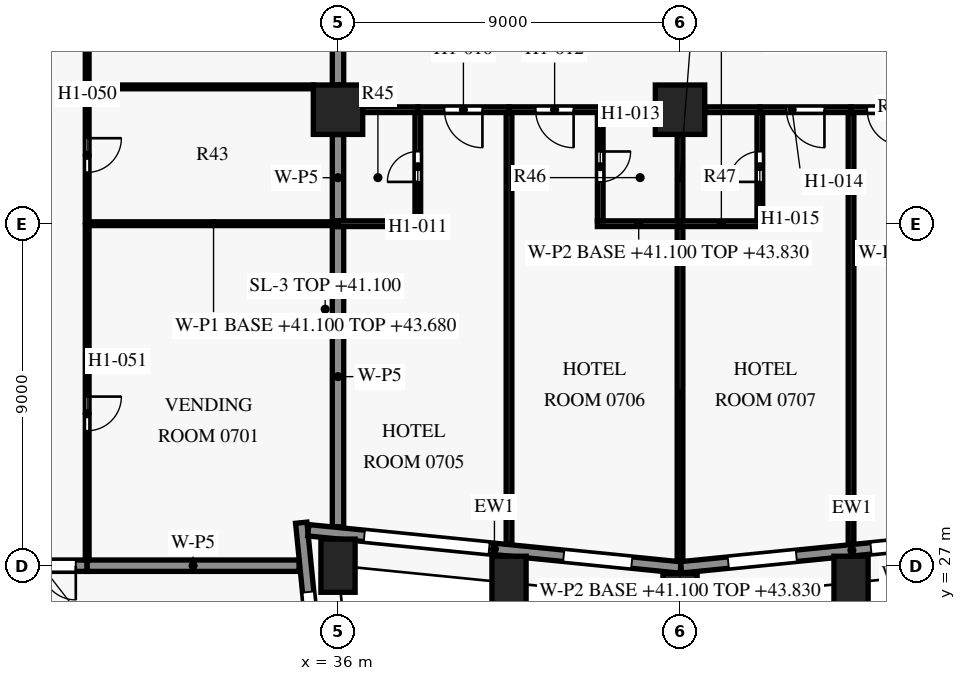
"""IFC4 building model, lengths in metres.
Left out: names, types, materials, properties, quantities, classifications, styles, units other than length and angle.
Written with IfcOpenShell. Run it as: python <this file> out.ifc"""

import sys

from ifc_helpers import new_model, si_unit, direction, frame, frame_2d, origin, origin_2d, place, context, subcontext, project, spatial, rectangle, extrude, element, fill, save


model = new_model("IFC4")
c1 = context("Model", 3, precision=1e-05, world=origin(), true_north=direction((0.0, 1.0)))
c2 = subcontext(c1, "Body", "Model", "MODEL_VIEW")
j1 = project(units=[si_unit("LENGTHUNIT", "METRE"), si_unit("PLANEANGLEUNIT", "RADIAN")], contexts=[c1])
p1 = place(None, origin())
s1 = spatial("IfcSite", under=j1, at=p1, CompositionType="ELEMENT")
p2 = place(p1, origin())
s2 = spatial("IfcBuilding", under=s1, at=p2, CompositionType="ELEMENT")
p3 = place(p2, frame((0.0, 0.0, 41.1)))
s3 = spatial("IfcBuildingStorey", under=s2, at=p3, CompositionType="ELEMENT", Elevation=41.1)
for number, where, z_axis, x_axis in (
    (1, (36.0, 27.0, 0.0), (0.0, 0.0, 1.0), (-0.1, 0.995, 0.0)),
    (2, (40.5, 26.55, 0.0), (0.0, 0.0, 1.0), (0.995, -0.1, 0.0)),
    (3, (45.0, 26.1, 0.0), (0.0, 0.0, 1.0), (1.0, 0.0, 0.0)),
    (4, (49.5, 26.55, 0.0), (0.0, 0.0, 1.0), (0.995, 0.1, 0.0)),
):
    element("IfcColumn", number, at=place(p3, frame(where, z_axis=z_axis, x_axis=x_axis)), inside=s3, PredefinedType="COLUMN", context=c2, shape_type="SweptSolid", body=[
        extrude(rectangle(XDim=0.9, YDim=1.4, at=origin_2d()), origin(), (0.0, 0.0, 1.0), 3.6),
    ])
for number, where, z_axis, x_axis in (
    (5, (36.0, 39.0, 0.0), (0.0, 0.0, 1.0), (1.0, 0.0, 0.0)),
    (6, (45.0, 39.0, 0.0), (0.0, 0.0, 1.0), (1.0, 0.0, 0.0)),
):
    element("IfcColumn", number, at=place(p3, frame(where, z_axis=z_axis, x_axis=x_axis)), inside=s3, PredefinedType="COLUMN", context=c2, shape_type="SweptSolid", body=[
        extrude(rectangle(XDim=1.3, YDim=1.3, at=origin_2d()), origin(), (0.0, 0.0, 1.0), 3.6),
    ])
p4 = place(p3, frame((35.033, 28.132, 0.0), z_axis=(0.0, 0.0, 1.0), x_axis=(0.099487051997, -0.995038856771, 0.0)))
e7 = element("IfcWall", 7, at=p4, inside=s3, PredefinedType="SOLIDWALL", context=c2, shape_type="SweptSolid", body=[
    extrude(rectangle(XDim=10.152, YDim=0.3, at=frame_2d((5.076, 0.0))), origin(), (0.0, 0.0, 1.0), 2.95),
])
p5 = place(p4, frame((1.833, 0.0, 0.15)))
e8 = element("IfcOpeningElement", 8, at=p5, cuts=e7, PredefinedType="OPENING", context=c2, shape_type="SweptSolid", body=[
    extrude(rectangle(XDim=3.3, YDim=2.4, at=frame_2d((1.65, 1.2))), frame((0.0, 0.16, 0.0), z_axis=(0.0, -1.0, 0.0), x_axis=(1.0, 0.0, 0.0)), (0.0, 0.0, 1.0), 0.32),
])
p6 = place(p4, frame((7.106, 0.0, 0.75)))
e9 = element("IfcOpeningElement", 9, at=p6, cuts=e7, PredefinedType="OPENING", context=c2, shape_type="SweptSolid", body=[
    extrude(rectangle(XDim=1.8, YDim=1.8, at=frame_2d((0.9, 0.9))), frame((0.0, 0.16, 0.0), z_axis=(0.0, -1.0, 0.0), x_axis=(1.0, 0.0, 0.0)), (0.0, 0.0, 1.0), 0.32),
])
p7 = place(p3, frame((45.015, 26.953, 0.0), z_axis=(0.0, 0.0, 1.0), x_axis=(-0.995036699177, 0.099508629231, 0.0)))
e10 = element("IfcWall", 10, at=p7, inside=s3, PredefinedType="SOLIDWALL", context=c2, shape_type="SweptSolid", body=[
    extrude(rectangle(XDim=9.846, YDim=0.3, at=frame_2d((4.923, 0.0))), origin(), (0.0, 0.0, 1.0), 2.95),
])
p8 = place(p7, frame((1.291, 0.0, 0.75)))
e11 = element("IfcOpeningElement", 11, at=p8, cuts=e10, PredefinedType="OPENING", context=c2, shape_type="SweptSolid", body=[
    extrude(rectangle(XDim=1.8, YDim=1.8, at=frame_2d((0.9, 0.9))), frame((0.0, 0.16, 0.0), z_axis=(0.0, -1.0, 0.0), x_axis=(1.0, 0.0, 0.0)), (0.0, 0.0, 1.0), 0.32),
])
p9 = place(p7, frame((5.064, 0.0, 0.15)))
e12 = element("IfcOpeningElement", 12, at=p9, cuts=e10, PredefinedType="OPENING", context=c2, shape_type="SweptSolid", body=[
    extrude(rectangle(XDim=3.3, YDim=2.4, at=frame_2d((1.65, 1.2))), frame((0.0, 0.16, 0.0), z_axis=(0.0, -1.0, 0.0), x_axis=(1.0, 0.0, 0.0)), (0.0, 0.0, 1.0), 0.32),
])
p10 = place(p3, frame((54.015, 27.856, 0.0), z_axis=(0.0, 0.0, 1.0), x_axis=(-0.995037993253, -0.099495688264, 0.0)))
e13 = element("IfcWall", 13, at=p10, inside=s3, PredefinedType="SOLIDWALL", context=c2, shape_type="SweptSolid", body=[
    extrude(rectangle(XDim=9.03, YDim=0.3, at=frame_2d((4.515, 0.0))), origin(), (0.0, 0.0, 1.0), 2.95),
])
p11 = place(p10, frame((0.711, 0.0, 0.15)))
e14 = element("IfcOpeningElement", 14, at=p11, cuts=e13, PredefinedType="OPENING", context=c2, shape_type="SweptSolid", body=[
    extrude(rectangle(XDim=3.3, YDim=2.4, at=frame_2d((1.65, 1.2))), frame((0.0, 0.16, 0.0), z_axis=(0.0, -1.0, 0.0), x_axis=(1.0, 0.0, 0.0)), (0.0, 0.0, 1.0), 0.32),
])
p12 = place(p10, frame((5.984, 0.0, 0.75)))
e15 = element("IfcOpeningElement", 15, at=p12, cuts=e13, PredefinedType="OPENING", context=c2, shape_type="SweptSolid", body=[
    extrude(rectangle(XDim=1.8, YDim=1.8, at=frame_2d((0.9, 0.9))), frame((0.0, 0.16, 0.0), z_axis=(0.0, -1.0, 0.0), x_axis=(1.0, 0.0, 0.0)), (0.0, 0.0, 1.0), 0.32),
])
p13 = place(p3, frame((29.4, 27.0, 0.0), z_axis=(0.0, 0.0, 1.0), x_axis=(-1.0, 0.0, 0.0)))
e16 = element("IfcWall", 16, at=p13, inside=s3, PredefinedType="PARTITIONING", context=c2, shape_type="SweptSolid", body=[
    extrude(rectangle(XDim=2.4, YDim=0.3, at=frame_2d((1.2, 0.0))), origin(), (0.0, 0.0, 1.0), 2.58),
])
p14 = place(p13, frame((0.3, 0.0, 0.0)))
e17 = element("IfcOpeningElement", 17, at=p14, cuts=e16, PredefinedType="OPENING", context=c2, shape_type="SweptSolid", body=[
    extrude(rectangle(XDim=1.8, YDim=2.1, at=frame_2d((0.9, 1.05))), frame((0.0, 0.16, 0.0), z_axis=(0.0, -1.0, 0.0), x_axis=(1.0, 0.0, 0.0)), (0.0, 0.0, 1.0), 0.32),
])
p15 = place(p3, frame((34.975, 27.0, 0.0), z_axis=(0.0, 0.0, 1.0), x_axis=(-1.0, 0.0, 0.0)))
e18 = element("IfcWall", 18, at=p15, inside=s3, PredefinedType="PARTITIONING", context=c2, shape_type="SweptSolid", body=[
    extrude(rectangle(XDim=5.575, YDim=0.3, at=frame_2d((2.788, 0.0))), origin(), (0.0, 0.0, 1.0), 2.58),
])
p16 = place(p3, frame((36.0, 35.925, 0.0), z_axis=(0.0, 0.0, 1.0), x_axis=(0.0, -1.0, 0.0)))
e19 = element("IfcWall", 19, at=p16, inside=s3, PredefinedType="PARTITIONING", context=c2, shape_type="SweptSolid", body=[
    extrude(rectangle(XDim=7.9, YDim=0.3, at=frame_2d((3.95, 0.0))), origin(), (0.0, 0.0, 1.0), 2.58),
])
p17 = place(p3, frame((45.0, 35.925, 0.0), z_axis=(0.0, 0.0, 1.0), x_axis=(0.0, -1.0, 0.0)))
e20 = element("IfcWall", 20, at=p17, inside=s3, PredefinedType="PARTITIONING", context=c2, shape_type="SweptSolid", body=[
    extrude(rectangle(XDim=8.8, YDim=0.15, at=frame_2d((4.4, 0.0))), origin(), (0.0, 0.0, 1.0), 2.73),
])
p18 = place(p3, frame((29.4, 35.95, 0.0), z_axis=(0.0, 0.0, 1.0), x_axis=(0.0, -1.0, 0.0)))
e21 = element("IfcWall", 21, at=p18, inside=s3, PredefinedType="PARTITIONING", context=c2, shape_type="SweptSolid", body=[
    extrude(rectangle(XDim=8.8, YDim=0.1, at=frame_2d((4.4, 0.0))), origin(), (0.0, 0.0, 1.0), 3.28),
])
p19 = place(p18, frame((4.5, 0.0, 0.0)))
e22 = element("IfcOpeningElement", 22, at=p19, cuts=e21, PredefinedType="OPENING", context=c2, shape_type="SweptSolid", body=[
    extrude(rectangle(XDim=0.9, YDim=2.1, at=frame_2d((0.45, 1.05))), frame((0.0, 0.06, 0.0), z_axis=(0.0, -1.0, 0.0), x_axis=(1.0, 0.0, 0.0)), (0.0, 0.0, 1.0), 0.12),
])
p20 = place(p3, frame((36.0, 36.0, 0.0), z_axis=(0.0, 0.0, 1.0), x_axis=(-1.0, 0.0, 0.0)))
e23 = element("IfcWall", 23, at=p20, inside=s3, PredefinedType="PARTITIONING", context=c2, shape_type="SweptSolid", body=[
    extrude(rectangle(XDim=6.55, YDim=0.1, at=frame_2d((3.275, 0.0))), origin(), (0.0, 0.0, 1.0), 2.58),
])
p21 = place(p3, frame((36.0, 36.0, 0.0), z_axis=(0.0, 0.0, 1.0), x_axis=(1.0, 0.0, 0.0)))
e24 = element("IfcWall", 24, at=p21, inside=s3, PredefinedType="PARTITIONING", context=c2, shape_type="SweptSolid", body=[
    extrude(rectangle(XDim=2.175, YDim=0.15, at=frame_2d((1.087, 0.0))), origin(), (0.0, 0.0, 1.0), 2.58),
])
for number, where, z_axis, x_axis in (
    (25, (42.825, 36.0, 0.0), (0.0, 0.0, 1.0), (1.0, 0.0, 0.0)),
    (26, (45.0, 36.0, 0.0), (0.0, 0.0, 1.0), (1.0, 0.0, 0.0)),
):
    element("IfcWall", number, at=place(p3, frame(where, z_axis=z_axis, x_axis=x_axis)), inside=s3, PredefinedType="PARTITIONING", context=c2, shape_type="SweptSolid", body=[
        extrude(rectangle(XDim=2.175, YDim=0.15, at=frame_2d((1.087, 0.0))), origin(), (0.0, 0.0, 1.0), 2.73),
    ])
p22 = place(p3, frame((38.1, 36.075, 0.0), z_axis=(0.0, 0.0, 1.0), x_axis=(0.0, 1.0, 0.0)))
e27 = element("IfcWall", 27, at=p22, inside=s3, PredefinedType="PARTITIONING", context=c2, shape_type="SweptSolid", body=[
    extrude(rectangle(XDim=2.85, YDim=0.15, at=frame_2d((1.425, 0.0))), origin(), (0.0, 0.0, 1.0), 2.58),
])
p23 = place(p22, frame((1.025, 0.0, 0.0)))
e28 = element("IfcOpeningElement", 28, at=p23, cuts=e27, PredefinedType="OPENING", context=c2, shape_type="SweptSolid", body=[
    extrude(rectangle(XDim=0.8, YDim=2.1, at=frame_2d((0.4, 1.05))), frame((0.0, 0.085, 0.0), z_axis=(0.0, -1.0, 0.0), x_axis=(1.0, 0.0, 0.0)), (0.0, 0.0, 1.0), 0.17),
])
p24 = place(p3, frame((47.1, 36.075, 0.0), z_axis=(0.0, 0.0, 1.0), x_axis=(0.0, 1.0, 0.0)))
e29 = element("IfcWall", 29, at=p24, inside=s3, PredefinedType="PARTITIONING", context=c2, shape_type="SweptSolid", body=[
    extrude(rectangle(XDim=2.85, YDim=0.15, at=frame_2d((1.425, 0.0))), origin(), (0.0, 0.0, 1.0), 2.58),
])
p25 = place(p24, frame((1.025, 0.0, 0.0)))
e30 = element("IfcOpeningElement", 30, at=p25, cuts=e29, PredefinedType="OPENING", context=c2, shape_type="SweptSolid", body=[
    extrude(rectangle(XDim=0.8, YDim=2.1, at=frame_2d((0.4, 1.05))), frame((0.0, 0.085, 0.0), z_axis=(0.0, -1.0, 0.0), x_axis=(1.0, 0.0, 0.0)), (0.0, 0.0, 1.0), 0.17),
])
p26 = place(p3, frame((36.0, 38.345, 0.0), z_axis=(0.0, 0.0, 1.0), x_axis=(0.0, -1.0, 0.0)))
e31 = element("IfcWall", 31, at=p26, inside=s3, PredefinedType="PARTITIONING", context=c2, shape_type="SweptSolid", body=[
    extrude(rectangle(XDim=2.27, YDim=0.3, at=frame_2d((1.135, 0.0))), origin(), (0.0, 0.0, 1.0), 2.58),
])
p27 = place(p3, frame((45.0, 38.345, 0.0), z_axis=(0.0, 0.0, 1.0), x_axis=(0.0, -1.0, 0.0)))
e32 = element("IfcWall", 32, at=p27, inside=s3, PredefinedType="PARTITIONING", context=c2, shape_type="SweptSolid", body=[
    extrude(rectangle(XDim=2.27, YDim=0.15, at=frame_2d((1.135, 0.0))), origin(), (0.0, 0.0, 1.0), 2.73),
])
p28 = place(p3, frame((40.5, 38.925, 0.0), z_axis=(0.0, 0.0, 1.0), x_axis=(0.0, -1.0, 0.0)))
e33 = element("IfcWall", 33, at=p28, inside=s3, PredefinedType="PARTITIONING", context=c2, shape_type="SweptSolid", body=[
    extrude(rectangle(XDim=11.35, YDim=0.15, at=frame_2d((5.675, 0.0))), origin(), (0.0, 0.0, 1.0), 2.58),
])
p29 = place(p3, frame((42.9, 38.925, 0.0), z_axis=(0.0, 0.0, 1.0), x_axis=(0.0, -1.0, 0.0)))
e34 = element("IfcWall", 34, at=p29, inside=s3, PredefinedType="PARTITIONING", context=c2, shape_type="SweptSolid", body=[
    extrude(rectangle(XDim=2.85, YDim=0.15, at=frame_2d((1.425, 0.0))), origin(), (0.0, 0.0, 1.0), 2.58),
])
p30 = place(p29, frame((1.025, 0.0, 0.0)))
e35 = element("IfcOpeningElement", 35, at=p30, cuts=e34, PredefinedType="OPENING", context=c2, shape_type="SweptSolid", body=[
    extrude(rectangle(XDim=0.8, YDim=2.1, at=frame_2d((0.4, 1.05))), frame((0.0, 0.085, 0.0), z_axis=(0.0, -1.0, 0.0), x_axis=(1.0, 0.0, 0.0)), (0.0, 0.0, 1.0), 0.17),
])
p31 = place(p3, frame((49.5, 38.925, 0.0), z_axis=(0.0, 0.0, 1.0), x_axis=(0.0, -1.0, 0.0)))
e36 = element("IfcWall", 36, at=p31, inside=s3, PredefinedType="PARTITIONING", context=c2, shape_type="SweptSolid", body=[
    extrude(rectangle(XDim=11.35, YDim=0.15, at=frame_2d((5.675, 0.0))), origin(), (0.0, 0.0, 1.0), 2.58),
])
p32 = place(p3, frame((38.1, 39.0, 0.0), z_axis=(0.0, 0.0, 1.0), x_axis=(-1.0, 0.0, 0.0)))
e37 = element("IfcWall", 37, at=p32, inside=s3, PredefinedType="PARTITIONING", context=c2, shape_type="SweptSolid", body=[
    extrude(rectangle(XDim=1.445, YDim=0.15, at=frame_2d((0.723, 0.0))), origin(), (0.0, 0.0, 1.0), 2.58),
])
p33 = place(p3, frame((40.5, 39.0, 0.0), z_axis=(0.0, 0.0, 1.0), x_axis=(-1.0, 0.0, 0.0)))
e38 = element("IfcWall", 38, at=p33, inside=s3, PredefinedType="PARTITIONING", context=c2, shape_type="SweptSolid", body=[
    extrude(rectangle(XDim=2.4, YDim=0.15, at=frame_2d((1.2, 0.0))), origin(), (0.0, 0.0, 1.0), 2.58),
])
p34 = place(p33, frame((0.7, 0.0, 0.0)))
e39 = element("IfcOpeningElement", 39, at=p34, cuts=e38, PredefinedType="OPENING", context=c2, shape_type="SweptSolid", body=[
    extrude(rectangle(XDim=1.0, YDim=2.1, at=frame_2d((0.5, 1.05))), frame((0.0, 0.085, 0.0), z_axis=(0.0, -1.0, 0.0), x_axis=(1.0, 0.0, 0.0)), (0.0, 0.0, 1.0), 0.17),
])
p35 = place(p3, frame((42.9, 39.0, 0.0), z_axis=(0.0, 0.0, 1.0), x_axis=(-1.0, 0.0, 0.0)))
e40 = element("IfcWall", 40, at=p35, inside=s3, PredefinedType="PARTITIONING", context=c2, shape_type="SweptSolid", body=[
    extrude(rectangle(XDim=2.4, YDim=0.15, at=frame_2d((1.2, 0.0))), origin(), (0.0, 0.0, 1.0), 2.58),
])
p36 = place(p35, frame((0.7, 0.0, 0.0)))
e41 = element("IfcOpeningElement", 41, at=p36, cuts=e40, PredefinedType="OPENING", context=c2, shape_type="SweptSolid", body=[
    extrude(rectangle(XDim=1.0, YDim=2.1, at=frame_2d((0.5, 1.05))), frame((0.0, 0.085, 0.0), z_axis=(0.0, -1.0, 0.0), x_axis=(1.0, 0.0, 0.0)), (0.0, 0.0, 1.0), 0.17),
])
for number, where, z_axis, x_axis in (
    (42, (44.345, 39.0, 0.0), (0.0, 0.0, 1.0), (-1.0, 0.0, 0.0)),
    (43, (47.1, 39.0, 0.0), (0.0, 0.0, 1.0), (-1.0, 0.0, 0.0)),
):
    element("IfcWall", number, at=place(p3, frame(where, z_axis=z_axis, x_axis=x_axis)), inside=s3, PredefinedType="PARTITIONING", context=c2, shape_type="SweptSolid", body=[
        extrude(rectangle(XDim=1.445, YDim=0.15, at=frame_2d((0.723, 0.0))), origin(), (0.0, 0.0, 1.0), 2.58),
    ])
p37 = place(p3, frame((49.5, 39.0, 0.0), z_axis=(0.0, 0.0, 1.0), x_axis=(-1.0, 0.0, 0.0)))
e44 = element("IfcWall", 44, at=p37, inside=s3, PredefinedType="PARTITIONING", context=c2, shape_type="SweptSolid", body=[
    extrude(rectangle(XDim=2.4, YDim=0.15, at=frame_2d((1.2, 0.0))), origin(), (0.0, 0.0, 1.0), 2.58),
])
p38 = place(p37, frame((0.7, 0.0, 0.0)))
e45 = element("IfcOpeningElement", 45, at=p38, cuts=e44, PredefinedType="OPENING", context=c2, shape_type="SweptSolid", body=[
    extrude(rectangle(XDim=1.0, YDim=2.1, at=frame_2d((0.5, 1.05))), frame((0.0, 0.085, 0.0), z_axis=(0.0, -1.0, 0.0), x_axis=(1.0, 0.0, 0.0)), (0.0, 0.0, 1.0), 0.17),
])
p39 = place(p3, frame((51.3, 39.0, 0.0), z_axis=(0.0, 0.0, 1.0), x_axis=(-1.0, 0.0, 0.0)))
e46 = element("IfcWall", 46, at=p39, inside=s3, PredefinedType="PARTITIONING", context=c2, shape_type="SweptSolid", body=[
    extrude(rectangle(XDim=1.8, YDim=0.15, at=frame_2d((0.9, 0.0))), origin(), (0.0, 0.0, 1.0), 2.58),
])
p40 = place(p39, frame((0.425, 0.0, 0.0)))
e47 = element("IfcOpeningElement", 47, at=p40, cuts=e46, PredefinedType="OPENING", context=c2, shape_type="SweptSolid", body=[
    extrude(rectangle(XDim=0.95, YDim=2.1, at=frame_2d((0.475, 1.05))), frame((0.0, 0.085, 0.0), z_axis=(0.0, -1.0, 0.0), x_axis=(1.0, 0.0, 0.0)), (0.0, 0.0, 1.0), 0.17),
])
p41 = place(p3, frame((29.4, 39.55, 0.0), z_axis=(0.0, 0.0, 1.0), x_axis=(0.0, -1.0, 0.0)))
e48 = element("IfcWall", 48, at=p41, inside=s3, PredefinedType="PARTITIONING", context=c2, shape_type="SweptSolid", body=[
    extrude(rectangle(XDim=3.5, YDim=0.1, at=frame_2d((1.75, 0.0))), origin(), (0.0, 0.0, 1.0), 3.28),
])
p42 = place(p41, frame((1.3, 0.0, 0.0)))
e49 = element("IfcOpeningElement", 49, at=p42, cuts=e48, PredefinedType="OPENING", context=c2, shape_type="SweptSolid", body=[
    extrude(rectangle(XDim=0.9, YDim=2.1, at=frame_2d((0.45, 1.05))), frame((0.0, 0.06, 0.0), z_axis=(0.0, -1.0, 0.0), x_axis=(1.0, 0.0, 0.0)), (0.0, 0.0, 1.0), 0.12),
])
p43 = place(p3, frame((35.345, 39.6, 0.0), z_axis=(0.0, 0.0, 1.0), x_axis=(-1.0, 0.0, 0.0)))
e50 = element("IfcWall", 50, at=p43, inside=s3, PredefinedType="PARTITIONING", context=c2, shape_type="SweptSolid", body=[
    extrude(rectangle(XDim=5.895, YDim=0.1, at=frame_2d((2.948, 0.0))), origin(), (0.0, 0.0, 1.0), 3.28),
])
p44 = place(p3, frame((29.4, 43.15, 0.0), z_axis=(0.0, 0.0, 1.0), x_axis=(0.0, -1.0, 0.0)))
e51 = element("IfcWall", 51, at=p44, inside=s3, PredefinedType="PARTITIONING", context=c2, shape_type="SweptSolid", body=[
    extrude(rectangle(XDim=3.5, YDim=0.1, at=frame_2d((1.75, 0.0))), origin(), (0.0, 0.0, 1.0), 3.28),
])
p45 = place(p3, frame((36.0, 43.15, 0.0), z_axis=(0.0, 0.0, 1.0), x_axis=(0.0, -1.0, 0.0)))
e52 = element("IfcWall", 52, at=p45, inside=s3, PredefinedType="PARTITIONING", context=c2, shape_type="SweptSolid", body=[
    extrude(rectangle(XDim=3.495, YDim=0.3, at=frame_2d((1.748, 0.0))), origin(), (0.0, 0.0, 1.0), 2.58),
])
p46 = place(p5, origin())
e53 = element("IfcWindow", 53, at=p46, inside=s3, PartitioningType="SINGLE_PANEL", PredefinedType="WINDOW", context=c2, shape_type="SweptSolid", body=[
    extrude(rectangle(XDim=3.3, YDim=2.4, at=frame_2d((1.65, 1.2))), frame((0.0, 0.03, 0.0), z_axis=(0.0, -1.0, 0.0), x_axis=(1.0, 0.0, 0.0)), (0.0, 0.0, 1.0), 0.06),
])
fill(e8, e53)
p47 = place(p8, origin())
e54 = element("IfcWindow", 54, at=p47, inside=s3, PartitioningType="SINGLE_PANEL", PredefinedType="WINDOW", context=c2, shape_type="SweptSolid", body=[
    extrude(rectangle(XDim=1.8, YDim=1.8, at=frame_2d((0.9, 0.9))), frame((0.0, 0.03, 0.0), z_axis=(0.0, -1.0, 0.0), x_axis=(1.0, 0.0, 0.0)), (0.0, 0.0, 1.0), 0.06),
])
fill(e11, e54)
p48 = place(p9, origin())
e55 = element("IfcWindow", 55, at=p48, inside=s3, PartitioningType="SINGLE_PANEL", PredefinedType="WINDOW", context=c2, shape_type="SweptSolid", body=[
    extrude(rectangle(XDim=3.3, YDim=2.4, at=frame_2d((1.65, 1.2))), frame((0.0, 0.03, 0.0), z_axis=(0.0, -1.0, 0.0), x_axis=(1.0, 0.0, 0.0)), (0.0, 0.0, 1.0), 0.06),
])
fill(e12, e55)
p49 = place(p11, origin())
e56 = element("IfcWindow", 56, at=p49, inside=s3, PartitioningType="SINGLE_PANEL", PredefinedType="WINDOW", context=c2, shape_type="SweptSolid", body=[
    extrude(rectangle(XDim=3.3, YDim=2.4, at=frame_2d((1.65, 1.2))), frame((0.0, 0.03, 0.0), z_axis=(0.0, -1.0, 0.0), x_axis=(1.0, 0.0, 0.0)), (0.0, 0.0, 1.0), 0.06),
])
fill(e14, e56)
p50 = place(p12, origin())
e57 = element("IfcWindow", 57, at=p50, inside=s3, PartitioningType="SINGLE_PANEL", PredefinedType="WINDOW", context=c2, shape_type="SweptSolid", body=[
    extrude(rectangle(XDim=1.8, YDim=1.8, at=frame_2d((0.9, 0.9))), frame((0.0, 0.03, 0.0), z_axis=(0.0, -1.0, 0.0), x_axis=(1.0, 0.0, 0.0)), (0.0, 0.0, 1.0), 0.06),
])
fill(e15, e57)
p51 = place(p34, origin())
e58 = element("IfcDoor", 58, at=p51, inside=s3, OperationType="SINGLE_SWING_LEFT", PredefinedType="DOOR", context=c2, shape_type="SweptSolid", body=[
    extrude(rectangle(XDim=1.0, YDim=2.1, at=frame_2d((0.5, 1.05))), frame((0.0, 0.025, 0.0), z_axis=(0.0, -1.0, 0.0), x_axis=(1.0, 0.0, 0.0)), (0.0, 0.0, 1.0), 0.05),
])
fill(e39, e58)
p52 = place(p23, origin())
e59 = element("IfcDoor", 59, at=p52, inside=s3, OperationType="SINGLE_SWING_LEFT", PredefinedType="DOOR", context=c2, shape_type="SweptSolid", body=[
    extrude(rectangle(XDim=0.8, YDim=2.1, at=frame_2d((0.4, 1.05))), frame((0.0, 0.025, 0.0), z_axis=(0.0, -1.0, 0.0), x_axis=(1.0, 0.0, 0.0)), (0.0, 0.0, 1.0), 0.05),
])
fill(e28, e59)
p53 = place(p36, origin())
e60 = element("IfcDoor", 60, at=p53, inside=s3, OperationType="SINGLE_SWING_LEFT", PredefinedType="DOOR", context=c2, shape_type="SweptSolid", body=[
    extrude(rectangle(XDim=1.0, YDim=2.1, at=frame_2d((0.5, 1.05))), frame((0.0, 0.025, 0.0), z_axis=(0.0, -1.0, 0.0), x_axis=(1.0, 0.0, 0.0)), (0.0, 0.0, 1.0), 0.05),
])
fill(e41, e60)
p54 = place(p30, origin())
e61 = element("IfcDoor", 61, at=p54, inside=s3, OperationType="SINGLE_SWING_LEFT", PredefinedType="DOOR", context=c2, shape_type="SweptSolid", body=[
    extrude(rectangle(XDim=0.8, YDim=2.1, at=frame_2d((0.4, 1.05))), frame((0.0, 0.025, 0.0), z_axis=(0.0, -1.0, 0.0), x_axis=(1.0, 0.0, 0.0)), (0.0, 0.0, 1.0), 0.05),
])
fill(e35, e61)
p55 = place(p38, origin())
e62 = element("IfcDoor", 62, at=p55, inside=s3, OperationType="SINGLE_SWING_LEFT", PredefinedType="DOOR", context=c2, shape_type="SweptSolid", body=[
    extrude(rectangle(XDim=1.0, YDim=2.1, at=frame_2d((0.5, 1.05))), frame((0.0, 0.025, 0.0), z_axis=(0.0, -1.0, 0.0), x_axis=(1.0, 0.0, 0.0)), (0.0, 0.0, 1.0), 0.05),
])
fill(e45, e62)
p56 = place(p25, origin())
e63 = element("IfcDoor", 63, at=p56, inside=s3, OperationType="SINGLE_SWING_LEFT", PredefinedType="DOOR", context=c2, shape_type="SweptSolid", body=[
    extrude(rectangle(XDim=0.8, YDim=2.1, at=frame_2d((0.4, 1.05))), frame((0.0, 0.025, 0.0), z_axis=(0.0, -1.0, 0.0), x_axis=(1.0, 0.0, 0.0)), (0.0, 0.0, 1.0), 0.05),
])
fill(e30, e63)
p57 = place(p40, origin())
e64 = element("IfcDoor", 64, at=p57, inside=s3, OperationType="SINGLE_SWING_LEFT", PredefinedType="DOOR", context=c2, shape_type="SweptSolid", body=[
    extrude(rectangle(XDim=0.95, YDim=2.1, at=frame_2d((0.475, 1.05))), frame((0.0, 0.025, 0.0), z_axis=(0.0, -1.0, 0.0), x_axis=(1.0, 0.0, 0.0)), (0.0, 0.0, 1.0), 0.05),
])
fill(e47, e64)
p58 = place(p42, origin())
e65 = element("IfcDoor", 65, at=p58, inside=s3, OperationType="SINGLE_SWING_RIGHT", PredefinedType="DOOR", context=c2, shape_type="SweptSolid", body=[
    extrude(rectangle(XDim=0.9, YDim=2.1, at=frame_2d((0.45, 1.05))), frame((0.0, 0.025, 0.0), z_axis=(0.0, -1.0, 0.0), x_axis=(1.0, 0.0, 0.0)), (0.0, 0.0, 1.0), 0.05),
])
fill(e49, e65)
p59 = place(p19, origin())
e66 = element("IfcDoor", 66, at=p59, inside=s3, OperationType="SINGLE_SWING_LEFT", PredefinedType="DOOR", context=c2, shape_type="SweptSolid", body=[
    extrude(rectangle(XDim=0.9, YDim=2.1, at=frame_2d((0.45, 1.05))), frame((0.0, 0.025, 0.0), z_axis=(0.0, -1.0, 0.0), x_axis=(1.0, 0.0, 0.0)), (0.0, 0.0, 1.0), 0.05),
])
fill(e22, e66)
p60 = place(p14, origin())
e67 = element("IfcDoor", 67, at=p60, inside=s3, OperationType="DOUBLE_DOOR_SINGLE_SWING", PredefinedType="DOOR", context=c2, shape_type="SweptSolid", body=[
    extrude(rectangle(XDim=1.8, YDim=2.1, at=frame_2d((0.9, 1.05))), frame((0.0, 0.025, 0.0), z_axis=(0.0, -1.0, 0.0), x_axis=(1.0, 0.0, 0.0)), (0.0, 0.0, 1.0), 0.05),
])
fill(e17, e67)
save(model, sys.argv[1])
